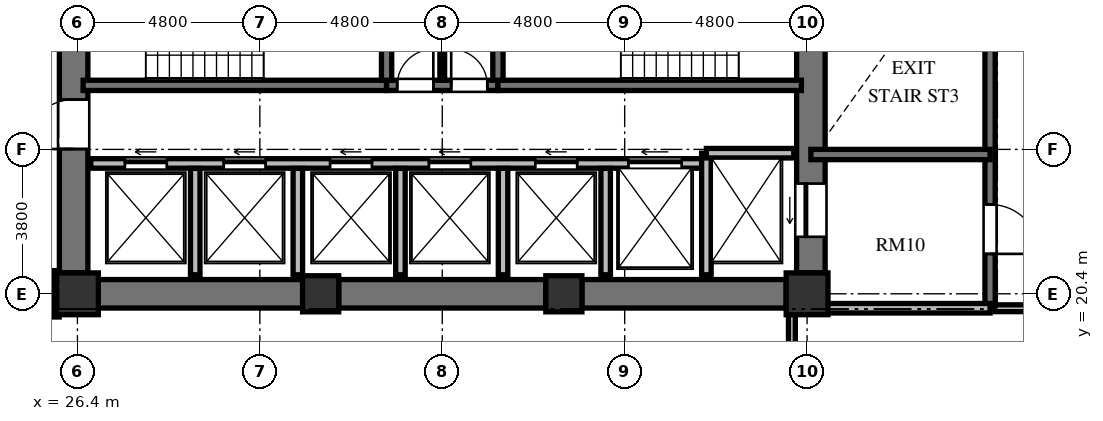
"""IFC4 building model, lengths in metres.
Left out: names, types, materials, properties, quantities, classifications, styles, units other than length and angle.
Written with IfcOpenShell. Run it as: python <this file> out.ifc"""

import sys

from ifc_helpers import new_model, si_unit, direction, frame, frame_2d, origin, origin_2d, place, context, subcontext, project, spatial, rectangle, extrude, element, fill, save


model = new_model("IFC4")
c1 = context("Model", 3, precision=1e-05, world=origin(), true_north=direction((0.0, 1.0)))
c2 = subcontext(c1, "Body", "Model", "MODEL_VIEW")
j1 = project(units=[si_unit("LENGTHUNIT", "METRE"), si_unit("PLANEANGLEUNIT", "RADIAN")], contexts=[c1])
p1 = place(None, origin())
s1 = spatial("IfcSite", under=j1, at=p1, CompositionType="ELEMENT")
p2 = place(p1, origin())
s2 = spatial("IfcBuilding", under=s1, at=p2, CompositionType="ELEMENT")
p3 = place(p2, frame((0.0, 0.0, 110.928)))
s3 = spatial("IfcBuildingStorey", under=s2, at=p3, CompositionType="ELEMENT", Elevation=110.928)
p4 = place(p3, frame((26.4, 20.4, 0.0), z_axis=(0.0, 0.0, 1.0), x_axis=(1.0, 0.0, 0.0)))
e1 = element("IfcColumn", 1, at=p4, inside=s3, PredefinedType="COLUMN", context=c2, shape_type="SweptSolid", body=[
    extrude(rectangle(XDim=1.1, YDim=1.1, at=origin_2d()), origin(), (0.0, 0.0, 1.0), 3.648),
])
for number, where, z_axis, x_axis in (
    (2, (32.8, 20.4, 0.0), (0.0, 0.0, 1.0), (1.0, 0.0, 0.0)),
    (3, (39.2, 20.4, 0.0), (0.0, 0.0, 1.0), (1.0, 0.0, 0.0)),
):
    element("IfcColumn", number, at=place(p3, frame(where, z_axis=z_axis, x_axis=x_axis)), inside=s3, PredefinedType="COLUMN", context=c2, shape_type="SweptSolid", body=[
        extrude(rectangle(XDim=0.95, YDim=0.95, at=origin_2d()), origin(), (0.0, 0.0, 1.0), 3.648),
    ])
p5 = place(p3, frame((45.6, 20.4, 0.0), z_axis=(0.0, 0.0, 1.0), x_axis=(1.0, 0.0, 0.0)))
e4 = element("IfcColumn", 4, at=p5, inside=s3, PredefinedType="COLUMN", context=c2, shape_type="SweptSolid", body=[
    extrude(rectangle(XDim=1.1, YDim=1.1, at=origin_2d()), origin(), (0.0, 0.0, 1.0), 3.648),
])
p6 = place(p3, frame((26.3, 20.95, 0.0), z_axis=(0.0, 0.0, 1.0), x_axis=(0.0, 1.0, 0.0)))
e5 = element("IfcWall", 5, at=p6, inside=s3, PredefinedType="SHEAR", context=c2, shape_type="SweptSolid", body=[
    extrude(rectangle(XDim=14.1, YDim=0.75, at=frame_2d((7.05, 0.0))), origin(), (0.0, 0.0, 1.0), 3.648),
])
p7 = place(p6, frame((6.5, 0.0, 0.0)))
e6 = element("IfcOpeningElement", 6, at=p7, cuts=e5, PredefinedType="OPENING", context=c2, shape_type="SweptSolid", body=[
    extrude(rectangle(XDim=1.2, YDim=2.15, at=frame_2d((0.6, 1.075))), frame((0.0, 0.385, 0.0), z_axis=(0.0, -1.0, 0.0), x_axis=(1.0, 0.0, 0.0)), (0.0, 0.0, 1.0), 0.77),
])
p8 = place(p6, frame((9.6, 0.0, 0.0)))
e7 = element("IfcOpeningElement", 7, at=p8, cuts=e5, PredefinedType="OPENING", context=c2, shape_type="SweptSolid", body=[
    extrude(rectangle(XDim=1.3, YDim=2.2, at=frame_2d((0.65, 1.1))), frame((0.0, 0.385, 0.0), z_axis=(0.0, -1.0, 0.0), x_axis=(1.0, 0.0, 0.0)), (0.0, 0.0, 1.0), 0.77),
])
p9 = place(p6, frame((3.26, 0.0, 0.0)))
e8 = element("IfcOpeningElement", 8, at=p9, cuts=e5, PredefinedType="OPENING", context=c2, shape_type="SweptSolid", body=[
    extrude(rectangle(XDim=1.3, YDim=2.2, at=frame_2d((0.65, 1.1))), frame((0.0, 0.385, 0.0), z_axis=(0.0, -1.0, 0.0), x_axis=(1.0, 0.0, 0.0)), (0.0, 0.0, 1.0), 0.77),
])
p10 = place(p3, frame((45.7, 20.95, 0.0), z_axis=(0.0, 0.0, 1.0), x_axis=(0.0, 1.0, 0.0)))
e9 = element("IfcWall", 9, at=p10, inside=s3, PredefinedType="SHEAR", context=c2, shape_type="SweptSolid", body=[
    extrude(rectangle(XDim=14.1, YDim=0.75, at=frame_2d((7.05, 0.0))), origin(), (0.0, 0.0, 1.0), 3.648),
])
p11 = place(p10, frame((11.75, 0.0, 0.0)))
e10 = element("IfcOpeningElement", 10, at=p11, cuts=e9, PredefinedType="OPENING", context=c2, shape_type="SweptSolid", body=[
    extrude(rectangle(XDim=1.4, YDim=2.3, at=frame_2d((0.7, 1.15))), frame((0.0, 0.385, 0.0), z_axis=(0.0, -1.0, 0.0), x_axis=(1.0, 0.0, 0.0)), (0.0, 0.0, 1.0), 0.77),
])
p12 = place(p10, frame((0.95, 0.0, 0.0)))
e11 = element("IfcOpeningElement", 11, at=p12, cuts=e9, PredefinedType="OPENING", context=c2, shape_type="SweptSolid", body=[
    extrude(rectangle(XDim=1.4, YDim=2.3, at=frame_2d((0.7, 1.15))), frame((0.0, 0.385, 0.0), z_axis=(0.0, -1.0, 0.0), x_axis=(1.0, 0.0, 0.0)), (0.0, 0.0, 1.0), 0.77),
])
p13 = place(p3, frame((26.95, 20.4, 0.0), z_axis=(0.0, 0.0, 1.0), x_axis=(1.0, 0.0, 0.0)))
e12 = element("IfcWall", 12, at=p13, inside=s3, PredefinedType="SHEAR", context=c2, shape_type="SweptSolid", body=[
    extrude(rectangle(XDim=5.375, YDim=0.75, at=frame_2d((2.688, 0.0))), origin(), (0.0, 0.0, 1.0), 3.648),
])
p14 = place(p3, frame((33.275, 20.4, 0.0), z_axis=(0.0, 0.0, 1.0), x_axis=(1.0, 0.0, 0.0)))
e13 = element("IfcWall", 13, at=p14, inside=s3, PredefinedType="SHEAR", context=c2, shape_type="SweptSolid", body=[
    extrude(rectangle(XDim=5.45, YDim=0.75, at=frame_2d((2.725, 0.0))), origin(), (0.0, 0.0, 1.0), 3.648),
])
p15 = place(p3, frame((39.675, 20.4, 0.0), z_axis=(0.0, 0.0, 1.0), x_axis=(1.0, 0.0, 0.0)))
e14 = element("IfcWall", 14, at=p15, inside=s3, PredefinedType="SHEAR", context=c2, shape_type="SweptSolid", body=[
    extrude(rectangle(XDim=5.375, YDim=0.75, at=frame_2d((2.688, 0.0))), origin(), (0.0, 0.0, 1.0), 3.648),
])
p16 = place(p3, frame((26.55, 25.885, 0.0), z_axis=(0.0, 0.0, 1.0), x_axis=(1.0, 0.0, 0.0)))
e15 = element("IfcWall", 15, at=p16, inside=s3, PredefinedType="SHEAR", context=c2, shape_type="SweptSolid", body=[
    extrude(rectangle(XDim=7.985, YDim=0.27, at=frame_2d((3.992, 0.0))), origin(), (0.0, 0.0, 1.0), 3.648),
])
p17 = place(p3, frame((34.535, 25.885, 0.0), z_axis=(0.0, 0.0, 1.0), x_axis=(1.0, 0.0, 0.0)))
e16 = element("IfcWall", 16, at=p17, inside=s3, PredefinedType="SHEAR", context=c2, shape_type="SweptSolid", body=[
    extrude(rectangle(XDim=2.93, YDim=0.27, at=frame_2d((1.465, 0.0))), origin(), (0.0, 0.0, 1.0), 3.648),
])
p18 = place(p17, frame((0.28, 0.0, 0.0)))
e17 = element("IfcOpeningElement", 17, at=p18, cuts=e16, PredefinedType="OPENING", context=c2, shape_type="SweptSolid", body=[
    extrude(rectangle(XDim=0.95, YDim=2.1, at=frame_2d((0.475, 1.05))), frame((0.0, 0.145, 0.0), z_axis=(0.0, -1.0, 0.0), x_axis=(1.0, 0.0, 0.0)), (0.0, 0.0, 1.0), 0.29),
])
p19 = place(p17, frame((1.7, 0.0, 0.0)))
e18 = element("IfcOpeningElement", 18, at=p19, cuts=e16, PredefinedType="OPENING", context=c2, shape_type="SweptSolid", body=[
    extrude(rectangle(XDim=0.95, YDim=2.1, at=frame_2d((0.475, 1.05))), frame((0.0, 0.145, 0.0), z_axis=(0.0, -1.0, 0.0), x_axis=(1.0, 0.0, 0.0)), (0.0, 0.0, 1.0), 0.29),
])
p20 = place(p3, frame((37.465, 25.885, 0.0), z_axis=(0.0, 0.0, 1.0), x_axis=(1.0, 0.0, 0.0)))
e19 = element("IfcWall", 19, at=p20, inside=s3, PredefinedType="SHEAR", context=c2, shape_type="SweptSolid", body=[
    extrude(rectangle(XDim=7.985, YDim=0.27, at=frame_2d((3.992, 0.0))), origin(), (0.0, 0.0, 1.0), 3.648),
])
for number, where, z_axis, x_axis in (
    (20, (34.535, 26.02, 0.0), (0.0, 0.0, 1.0), (0.0, 1.0, 0.0)),
    (21, (37.465, 26.02, 0.0), (0.0, 0.0, 1.0), (0.0, 1.0, 0.0)),
):
    element("IfcWall", number, at=place(p3, frame(where, z_axis=z_axis, x_axis=x_axis)), inside=s3, PredefinedType="SHEAR", context=c2, shape_type="SweptSolid", body=[
        extrude(rectangle(XDim=4.08, YDim=0.27, at=frame_2d((2.04, 0.0))), origin(), (0.0, 0.0, 1.0), 3.648),
    ])
p21 = place(p3, frame((36.0, 26.02, 0.0), z_axis=(0.0, 0.0, 1.0), x_axis=(0.0, 1.0, 0.0)))
e22 = element("IfcWall", 22, at=p21, inside=s3, PredefinedType="PARTITIONING", context=c2, shape_type="SweptSolid", body=[
    extrude(rectangle(XDim=4.08, YDim=0.125, at=frame_2d((2.04, 0.0))), origin(), (0.0, 0.0, 1.0), 3.428),
])
p22 = place(p3, frame((26.75, 23.83, 0.0), z_axis=(0.0, 0.0, 1.0), x_axis=(1.0, 0.0, 0.0)))
e23 = element("IfcWall", 23, at=p22, inside=s3, PredefinedType="SOLIDWALL", context=c2, shape_type="SweptSolid", body=[
    extrude(rectangle(XDim=16.2, YDim=0.25, at=frame_2d((8.1, 0.0))), origin(), (0.0, 0.0, 1.0), 3.428),
])
p23 = place(p22, frame((0.9, 0.0, 0.0)))
e24 = element("IfcOpeningElement", 24, at=p23, cuts=e23, PredefinedType="OPENING", context=c2, shape_type="SweptSolid", body=[
    extrude(rectangle(XDim=1.1, YDim=2.2, at=frame_2d((0.55, 1.1))), frame((0.0, 0.135, 0.0), z_axis=(0.0, -1.0, 0.0), x_axis=(1.0, 0.0, 0.0)), (0.0, 0.0, 1.0), 0.27),
])
p24 = place(p22, frame((3.5, 0.0, 0.0)))
e25 = element("IfcOpeningElement", 25, at=p24, cuts=e23, PredefinedType="OPENING", context=c2, shape_type="SweptSolid", body=[
    extrude(rectangle(XDim=1.1, YDim=2.2, at=frame_2d((0.55, 1.1))), frame((0.0, 0.135, 0.0), z_axis=(0.0, -1.0, 0.0), x_axis=(1.0, 0.0, 0.0)), (0.0, 0.0, 1.0), 0.27),
])
p25 = place(p22, frame((6.3, 0.0, 0.0)))
e26 = element("IfcOpeningElement", 26, at=p25, cuts=e23, PredefinedType="OPENING", context=c2, shape_type="SweptSolid", body=[
    extrude(rectangle(XDim=1.1, YDim=2.2, at=frame_2d((0.55, 1.1))), frame((0.0, 0.135, 0.0), z_axis=(0.0, -1.0, 0.0), x_axis=(1.0, 0.0, 0.0)), (0.0, 0.0, 1.0), 0.27),
])
p26 = place(p22, frame((8.9, 0.0, 0.0)))
e27 = element("IfcOpeningElement", 27, at=p26, cuts=e23, PredefinedType="OPENING", context=c2, shape_type="SweptSolid", body=[
    extrude(rectangle(XDim=1.1, YDim=2.2, at=frame_2d((0.55, 1.1))), frame((0.0, 0.135, 0.0), z_axis=(0.0, -1.0, 0.0), x_axis=(1.0, 0.0, 0.0)), (0.0, 0.0, 1.0), 0.27),
])
p27 = place(p22, frame((11.7, 0.0, 0.0)))
e28 = element("IfcOpeningElement", 28, at=p27, cuts=e23, PredefinedType="OPENING", context=c2, shape_type="SweptSolid", body=[
    extrude(rectangle(XDim=1.1, YDim=2.2, at=frame_2d((0.55, 1.1))), frame((0.0, 0.135, 0.0), z_axis=(0.0, -1.0, 0.0), x_axis=(1.0, 0.0, 0.0)), (0.0, 0.0, 1.0), 0.27),
])
p28 = place(p22, frame((14.15, 0.0, 0.0)))
e29 = element("IfcOpeningElement", 29, at=p28, cuts=e23, PredefinedType="OPENING", context=c2, shape_type="SweptSolid", body=[
    extrude(rectangle(XDim=1.4, YDim=2.3, at=frame_2d((0.7, 1.15))), frame((0.0, 0.135, 0.0), z_axis=(0.0, -1.0, 0.0), x_axis=(1.0, 0.0, 0.0)), (0.0, 0.0, 1.0), 0.27),
])
p29 = place(p3, frame((42.95, 20.9, 0.0), z_axis=(0.0, 0.0, 1.0), x_axis=(0.0, 1.0, 0.0)))
e30 = element("IfcWall", 30, at=p29, inside=s3, PredefinedType="SOLIDWALL", context=c2, shape_type="SweptSolid", body=[
    extrude(rectangle(XDim=3.2, YDim=0.25, at=frame_2d((1.6, 0.0))), origin(), (0.0, 0.0, 1.0), 3.428),
])
p30 = place(p3, frame((42.95, 24.1, 0.0), z_axis=(0.0, 0.0, 1.0), x_axis=(1.0, 0.0, 0.0)))
e31 = element("IfcWall", 31, at=p30, inside=s3, PredefinedType="SOLIDWALL", context=c2, shape_type="SweptSolid", body=[
    extrude(rectangle(XDim=2.3, YDim=0.25, at=frame_2d((1.15, 0.0))), origin(), (0.0, 0.0, 1.0), 3.428),
])
for number, where, z_axis, x_axis in (
    (32, (29.5, 20.9, 0.0), (0.0, 0.0, 1.0), (0.0, 1.0, 0.0)),
    (33, (32.2, 20.9, 0.0), (0.0, 0.0, 1.0), (0.0, 1.0, 0.0)),
    (34, (34.9, 20.9, 0.0), (0.0, 0.0, 1.0), (0.0, 1.0, 0.0)),
    (35, (37.6, 20.9, 0.0), (0.0, 0.0, 1.0), (0.0, 1.0, 0.0)),
    (36, (40.3, 20.9, 0.0), (0.0, 0.0, 1.0), (0.0, 1.0, 0.0)),
):
    element("IfcWall", number, at=place(p3, frame(where, z_axis=z_axis, x_axis=x_axis)), inside=s3, PredefinedType="SOLIDWALL", context=c2, shape_type="SweptSolid", body=[
        extrude(rectangle(XDim=2.8, YDim=0.25, at=frame_2d((1.4, 0.0))), origin(), (0.0, 0.0, 1.0), 3.428),
    ])
p31 = place(p3, frame((50.415, 35.845, 0.0), z_axis=(0.0, 0.0, 1.0), x_axis=(0.0, -1.0, 0.0)))
e37 = element("IfcWall", 37, at=p31, inside=s3, PredefinedType="SHEAR", context=c2, shape_type="SweptSolid", body=[
    extrude(rectangle(XDim=15.825, YDim=0.27, at=frame_2d((7.913, 0.0))), origin(), (0.0, 0.0, 1.0), 3.648),
])
p32 = place(p31, frame((4.445, 0.0, 0.0)))
e38 = element("IfcOpeningElement", 38, at=p32, cuts=e37, PredefinedType="OPENING", context=c2, shape_type="SweptSolid", body=[
    extrude(rectangle(XDim=1.2, YDim=2.15, at=frame_2d((0.6, 1.075))), frame((0.0, 0.145, 0.0), z_axis=(0.0, -1.0, 0.0), x_axis=(1.0, 0.0, 0.0)), (0.0, 0.0, 1.0), 0.29),
])
p33 = place(p31, frame((1.295, 0.0, 0.0)))
e39 = element("IfcOpeningElement", 39, at=p33, cuts=e37, PredefinedType="OPENING", context=c2, shape_type="SweptSolid", body=[
    extrude(rectangle(XDim=1.3, YDim=2.2, at=frame_2d((0.65, 1.1))), frame((0.0, 0.145, 0.0), z_axis=(0.0, -1.0, 0.0), x_axis=(1.0, 0.0, 0.0)), (0.0, 0.0, 1.0), 0.29),
])
p34 = place(p31, frame((13.095, 0.0, 0.0)))
e40 = element("IfcOpeningElement", 40, at=p34, cuts=e37, PredefinedType="OPENING", context=c2, shape_type="SweptSolid", body=[
    extrude(rectangle(XDim=1.3, YDim=2.2, at=frame_2d((0.65, 1.1))), frame((0.0, 0.145, 0.0), z_axis=(0.0, -1.0, 0.0), x_axis=(1.0, 0.0, 0.0)), (0.0, 0.0, 1.0), 0.29),
])
p35 = place(p3, frame((45.7, 24.065, 0.0), z_axis=(0.0, 0.0, 1.0), x_axis=(1.0, 0.0, 0.0)))
e41 = element("IfcWall", 41, at=p35, inside=s3, PredefinedType="SHEAR", context=c2, shape_type="SweptSolid", body=[
    extrude(rectangle(XDim=4.715, YDim=0.27, at=frame_2d((2.357, 0.0))), origin(), (0.0, 0.0, 1.0), 3.648),
])
p36 = place(p3, frame((45.7, 20.02, 0.0), z_axis=(0.0, 0.0, 1.0), x_axis=(1.0, 0.0, 0.0)))
e42 = element("IfcWall", 42, at=p36, inside=s3, PredefinedType="SOLIDWALL", context=c2, shape_type="SweptSolid", body=[
    extrude(rectangle(XDim=4.715, YDim=0.25, at=frame_2d((2.357, 0.0))), origin(), (0.0, 0.0, 1.0), 3.428),
])
p37 = place(p3, frame((53.19, 20.02, 0.0), z_axis=(0.0, 0.0, 1.0), x_axis=(-1.0, 0.0, 0.0)))
e43 = element("IfcWall", 43, at=p37, inside=s3, PredefinedType="PARTITIONING", context=c2, shape_type="SweptSolid", body=[
    extrude(rectangle(XDim=2.65, YDim=0.18, at=frame_2d((1.325, 0.0))), origin(), (0.0, 0.0, 1.0), 3.428),
])
p38 = place(p3, frame((25.83, 21.01, 0.0), z_axis=(0.0, 0.0, 1.0), x_axis=(0.0, -1.0, 0.0)))
e44 = element("IfcWall", 44, at=p38, inside=s3, PredefinedType="PARTITIONING", context=c2, shape_type="SweptSolid", body=[
    extrude(rectangle(XDim=1.22, YDim=0.18, at=frame_2d((0.61, 0.0))), origin(), (0.0, 0.0, 1.0), 3.428),
])
p39 = place(p3, frame((45.2, 19.91, 0.0), z_axis=(0.0, 0.0, 1.0), x_axis=(0.0, -1.0, 0.0)))
e45 = element("IfcWall", 45, at=p39, inside=s3, PredefinedType="PARTITIONING", context=c2, shape_type="SweptSolid", body=[
    extrude(rectangle(XDim=2.55, YDim=0.18, at=frame_2d((1.275, 0.0))), origin(), (0.0, 0.0, 1.0), 3.428),
])
p40 = place(p18, origin())
e46 = element("IfcDoor", 46, at=p40, inside=s3, OperationType="SINGLE_SWING_RIGHT", PredefinedType="DOOR", context=c2, shape_type="SweptSolid", body=[
    extrude(rectangle(XDim=0.95, YDim=2.1, at=frame_2d((0.475, 1.05))), frame((0.0, 0.025, 0.0), z_axis=(0.0, -1.0, 0.0), x_axis=(1.0, 0.0, 0.0)), (0.0, 0.0, 1.0), 0.05),
])
fill(e17, e46)
p41 = place(p19, origin())
e47 = element("IfcDoor", 47, at=p41, inside=s3, OperationType="SINGLE_SWING_LEFT", PredefinedType="DOOR", context=c2, shape_type="SweptSolid", body=[
    extrude(rectangle(XDim=0.95, YDim=2.1, at=frame_2d((0.475, 1.05))), frame((0.0, 0.025, 0.0), z_axis=(0.0, -1.0, 0.0), x_axis=(1.0, 0.0, 0.0)), (0.0, 0.0, 1.0), 0.05),
])
fill(e18, e47)
p42 = place(p9, origin())
e48 = element("IfcDoor", 48, at=p42, inside=s3, OperationType="SINGLE_SWING_LEFT", PredefinedType="DOOR", context=c2, shape_type="SweptSolid", body=[
    extrude(rectangle(XDim=1.3, YDim=2.2, at=frame_2d((0.65, 1.1))), frame((0.0, 0.025, 0.0), z_axis=(0.0, -1.0, 0.0), x_axis=(1.0, 0.0, 0.0)), (0.0, 0.0, 1.0), 0.05),
])
fill(e8, e48)
p43 = place(p23, origin())
e49 = element("IfcDoor", 49, at=p43, inside=s3, OperationType="SLIDING_TO_LEFT", PredefinedType="DOOR", context=c2, shape_type="SweptSolid", body=[
    extrude(rectangle(XDim=1.1, YDim=2.2, at=frame_2d((0.55, 1.1))), frame((0.0, 0.025, 0.0), z_axis=(0.0, -1.0, 0.0), x_axis=(1.0, 0.0, 0.0)), (0.0, 0.0, 1.0), 0.05),
])
fill(e24, e49)
p44 = place(p24, origin())
e50 = element("IfcDoor", 50, at=p44, inside=s3, OperationType="SLIDING_TO_LEFT", PredefinedType="DOOR", context=c2, shape_type="SweptSolid", body=[
    extrude(rectangle(XDim=1.1, YDim=2.2, at=frame_2d((0.55, 1.1))), frame((0.0, 0.025, 0.0), z_axis=(0.0, -1.0, 0.0), x_axis=(1.0, 0.0, 0.0)), (0.0, 0.0, 1.0), 0.05),
])
fill(e25, e50)
p45 = place(p25, origin())
e51 = element("IfcDoor", 51, at=p45, inside=s3, OperationType="SLIDING_TO_LEFT", PredefinedType="DOOR", context=c2, shape_type="SweptSolid", body=[
    extrude(rectangle(XDim=1.1, YDim=2.2, at=frame_2d((0.55, 1.1))), frame((0.0, 0.025, 0.0), z_axis=(0.0, -1.0, 0.0), x_axis=(1.0, 0.0, 0.0)), (0.0, 0.0, 1.0), 0.05),
])
fill(e26, e51)
p46 = place(p26, origin())
e52 = element("IfcDoor", 52, at=p46, inside=s3, OperationType="SLIDING_TO_LEFT", PredefinedType="DOOR", context=c2, shape_type="SweptSolid", body=[
    extrude(rectangle(XDim=1.1, YDim=2.2, at=frame_2d((0.55, 1.1))), frame((0.0, 0.025, 0.0), z_axis=(0.0, -1.0, 0.0), x_axis=(1.0, 0.0, 0.0)), (0.0, 0.0, 1.0), 0.05),
])
fill(e27, e52)
p47 = place(p27, origin())
e53 = element("IfcDoor", 53, at=p47, inside=s3, OperationType="SLIDING_TO_LEFT", PredefinedType="DOOR", context=c2, shape_type="SweptSolid", body=[
    extrude(rectangle(XDim=1.1, YDim=2.2, at=frame_2d((0.55, 1.1))), frame((0.0, 0.025, 0.0), z_axis=(0.0, -1.0, 0.0), x_axis=(1.0, 0.0, 0.0)), (0.0, 0.0, 1.0), 0.05),
])
fill(e28, e53)
p48 = place(p12, origin())
e54 = element("IfcDoor", 54, at=p48, inside=s3, OperationType="SLIDING_TO_LEFT", PredefinedType="DOOR", context=c2, shape_type="SweptSolid", body=[
    extrude(rectangle(XDim=1.4, YDim=2.3, at=frame_2d((0.7, 1.15))), frame((0.0, 0.025, 0.0), z_axis=(0.0, -1.0, 0.0), x_axis=(1.0, 0.0, 0.0)), (0.0, 0.0, 1.0), 0.05),
])
fill(e11, e54)
p49 = place(p28, origin())
e55 = element("IfcDoor", 55, at=p49, inside=s3, OperationType="SLIDING_TO_LEFT", PredefinedType="DOOR", context=c2, shape_type="SweptSolid", body=[
    extrude(rectangle(XDim=1.4, YDim=2.3, at=frame_2d((0.7, 1.15))), frame((0.0, 0.025, 0.0), z_axis=(0.0, -1.0, 0.0), x_axis=(1.0, 0.0, 0.0)), (0.0, 0.0, 1.0), 0.05),
])
fill(e29, e55)
p50 = place(p34, origin())
e56 = element("IfcDoor", 56, at=p50, inside=s3, OperationType="SINGLE_SWING_RIGHT", PredefinedType="DOOR", context=c2, shape_type="SweptSolid", body=[
    extrude(rectangle(XDim=1.3, YDim=2.2, at=frame_2d((0.65, 1.1))), frame((0.0, 0.025, 0.0), z_axis=(0.0, -1.0, 0.0), x_axis=(1.0, 0.0, 0.0)), (0.0, 0.0, 1.0), 0.05),
])
fill(e40, e56)
save(model, sys.argv[1])
